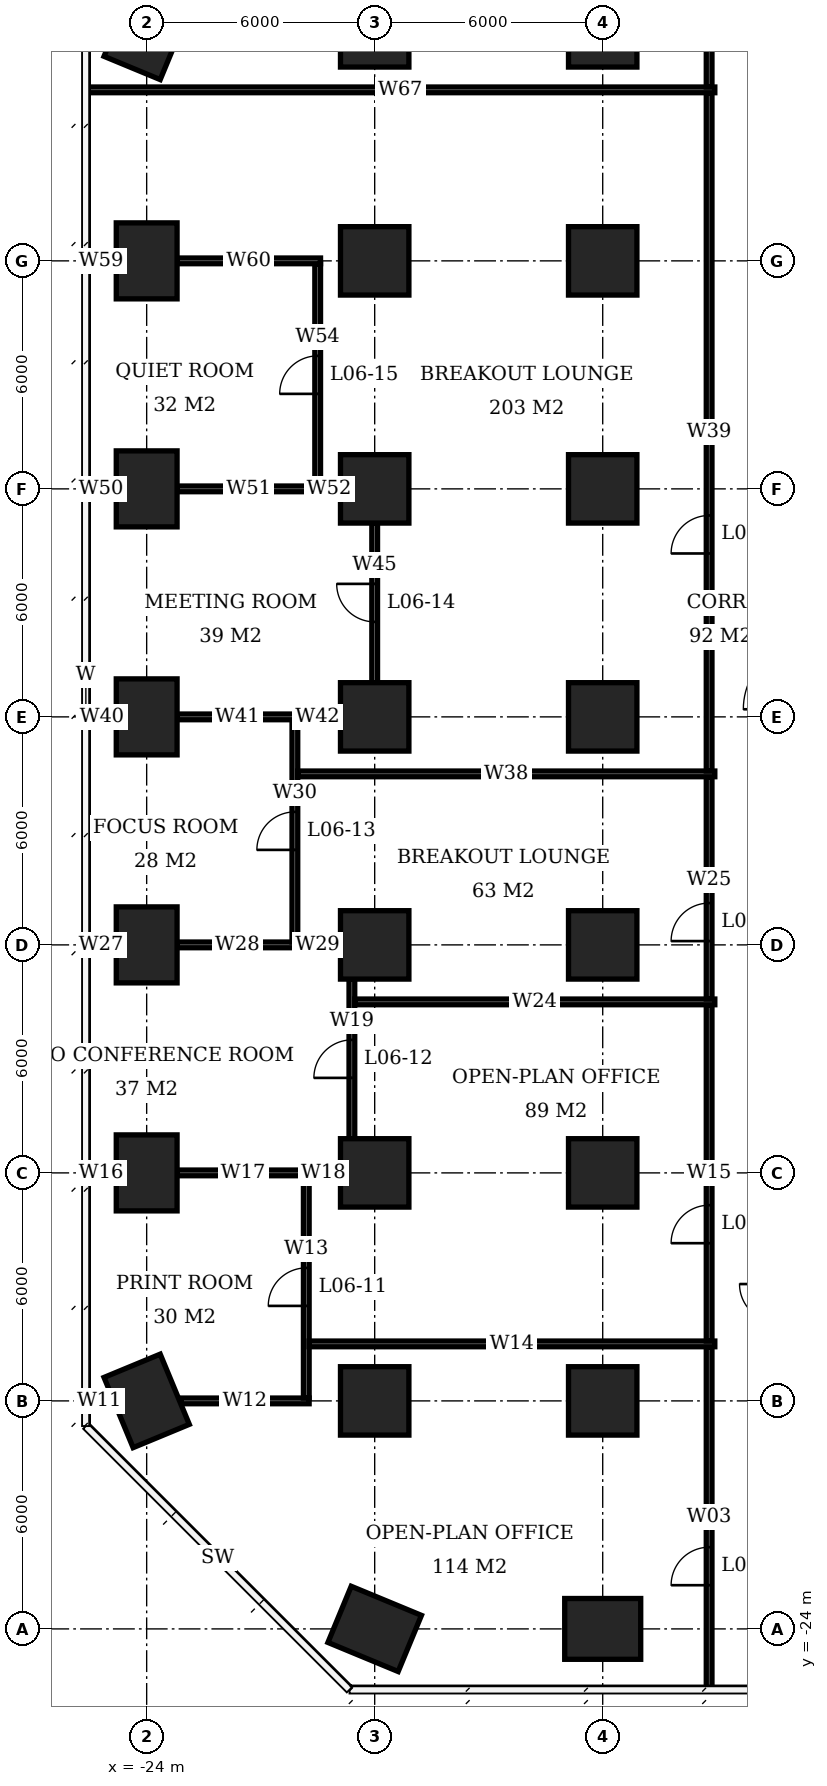
"""IFC4 building model, lengths in metres.
Left out: names, types, materials, properties, quantities, classifications, styles, units other than length and angle.
Written with IfcOpenShell. Run it as: python <this file> out.ifc"""

import sys

from ifc_helpers import new_model, si_unit, direction, frame, frame_2d, origin, origin_2d, place, context, subcontext, project, spatial, rectangle, extrude, element, fill, save


model = new_model("IFC4")
c1 = context("Model", 3, precision=1e-05, world=origin(), true_north=direction((0.0, 1.0)))
c2 = subcontext(c1, "Body", "Model", "MODEL_VIEW")
j1 = project(units=[si_unit("LENGTHUNIT", "METRE"), si_unit("PLANEANGLEUNIT", "RADIAN")], contexts=[c1])
p1 = place(None, origin())
s1 = spatial("IfcSite", under=j1, at=p1, CompositionType="ELEMENT")
p2 = place(p1, origin())
s2 = spatial("IfcBuilding", under=s1, at=p2, CompositionType="ELEMENT")
p3 = place(p2, frame((0.0, 0.0, 29.9)))
s3 = spatial("IfcBuildingStorey", under=s2, at=p3, CompositionType="ELEMENT", Elevation=29.9)
for number, where, z_axis, x_axis in (
    (1, (-24.0, -18.0, 0.0), (0.0, 0.0, 1.0), (-0.383, 0.924, 0.0)),
    (2, (-24.0, -12.0, 0.0), (0.0, 0.0, 1.0), (0.0, 1.0, 0.0)),
    (3, (-24.0, -6.0, 0.0), (0.0, 0.0, 1.0), (0.0, 1.0, 0.0)),
    (4, (-24.0, 0.0, 0.0), (0.0, 0.0, 1.0), (0.0, 1.0, 0.0)),
    (5, (-24.0, 6.0, 0.0), (0.0, 0.0, 1.0), (0.0, 1.0, 0.0)),
    (6, (-24.0, 12.0, 0.0), (0.0, 0.0, 1.0), (0.0, 1.0, 0.0)),
    (7, (-24.0, 18.0, 0.0), (0.0, 0.0, 1.0), (0.383, 0.924, 0.0)),
    (8, (-18.0, -24.0, 0.0), (0.0, 0.0, 1.0), (-0.924, 0.383, 0.0)),
):
    element("IfcColumn", number, at=place(p3, frame(where, z_axis=z_axis, x_axis=x_axis)), inside=s3, PredefinedType="COLUMN", context=c2, shape_type="SweptSolid", body=[
        extrude(rectangle(XDim=2.0, YDim=1.6, at=origin_2d()), origin(), (0.0, 0.0, 1.0), 3.9),
    ])
for number, where, z_axis, x_axis in (
    (9, (-18.0, -18.0, 0.0), (0.0, 0.0, 1.0), (1.0, 0.0, 0.0)),
    (10, (-18.0, -12.0, 0.0), (0.0, 0.0, 1.0), (1.0, 0.0, 0.0)),
    (11, (-18.0, -6.0, 0.0), (0.0, 0.0, 1.0), (1.0, 0.0, 0.0)),
    (12, (-18.0, 0.0, 0.0), (0.0, 0.0, 1.0), (1.0, 0.0, 0.0)),
    (13, (-18.0, 6.0, 0.0), (0.0, 0.0, 1.0), (1.0, 0.0, 0.0)),
    (14, (-18.0, 12.0, 0.0), (0.0, 0.0, 1.0), (1.0, 0.0, 0.0)),
    (15, (-18.0, 18.0, 0.0), (0.0, 0.0, 1.0), (1.0, 0.0, 0.0)),
):
    element("IfcColumn", number, at=place(p3, frame(where, z_axis=z_axis, x_axis=x_axis)), inside=s3, PredefinedType="COLUMN", context=c2, shape_type="SweptSolid", body=[
        extrude(rectangle(XDim=1.8, YDim=1.8, at=origin_2d()), origin(), (0.0, 0.0, 1.0), 3.9),
    ])
p4 = place(p3, frame((-12.0, -24.0, 0.0), z_axis=(0.0, 0.0, 1.0), x_axis=(1.0, 0.0, 0.0)))
e16 = element("IfcColumn", 16, at=p4, inside=s3, PredefinedType="COLUMN", context=c2, shape_type="SweptSolid", body=[
    extrude(rectangle(XDim=2.0, YDim=1.6, at=origin_2d()), origin(), (0.0, 0.0, 1.0), 3.9),
])
for number, where, z_axis, x_axis in (
    (17, (-12.0, -18.0, 0.0), (0.0, 0.0, 1.0), (1.0, 0.0, 0.0)),
    (18, (-12.0, -12.0, 0.0), (0.0, 0.0, 1.0), (1.0, 0.0, 0.0)),
    (19, (-12.0, -6.0, 0.0), (0.0, 0.0, 1.0), (1.0, 0.0, 0.0)),
    (20, (-12.0, 0.0, 0.0), (0.0, 0.0, 1.0), (1.0, 0.0, 0.0)),
    (21, (-12.0, 6.0, 0.0), (0.0, 0.0, 1.0), (1.0, 0.0, 0.0)),
    (22, (-12.0, 12.0, 0.0), (0.0, 0.0, 1.0), (1.0, 0.0, 0.0)),
    (23, (-12.0, 18.0, 0.0), (0.0, 0.0, 1.0), (1.0, 0.0, 0.0)),
):
    element("IfcColumn", number, at=place(p3, frame(where, z_axis=z_axis, x_axis=x_axis)), inside=s3, PredefinedType="COLUMN", context=c2, shape_type="SweptSolid", body=[
        extrude(rectangle(XDim=1.8, YDim=1.8, at=origin_2d()), origin(), (0.0, 0.0, 1.0), 3.9),
    ])
p5 = place(p3, frame((-25.6, -18.0, 0.0), z_axis=(0.0, 0.0, 1.0), x_axis=(1.0, 0.0, 0.0)))
e24 = element("IfcWall", 24, at=p5, inside=s3, PredefinedType="PARTITIONING", context=c2, shape_type="SweptSolid", body=[
    extrude(rectangle(XDim=0.703, YDim=0.15, at=frame_2d((0.352, 0.0))), origin(), (0.0, 0.0, 1.0), 3.65),
])
p6 = place(p3, frame((-23.103, -18.0, 0.0), z_axis=(0.0, 0.0, 1.0), x_axis=(1.0, 0.0, 0.0)))
e25 = element("IfcWall", 25, at=p6, inside=s3, PredefinedType="PARTITIONING", context=c2, shape_type="SweptSolid", body=[
    extrude(rectangle(XDim=3.378, YDim=0.15, at=frame_2d((1.689, 0.0))), origin(), (0.0, 0.0, 1.0), 3.65),
])
p7 = place(p3, frame((-25.6, -12.0, 0.0), z_axis=(0.0, 0.0, 1.0), x_axis=(1.0, 0.0, 0.0)))
e26 = element("IfcWall", 26, at=p7, inside=s3, PredefinedType="PARTITIONING", context=c2, shape_type="SweptSolid", body=[
    extrude(rectangle(XDim=0.8, YDim=0.15, at=frame_2d((0.4, 0.0))), origin(), (0.0, 0.0, 1.0), 3.65),
])
p8 = place(p3, frame((-23.2, -12.0, 0.0), z_axis=(0.0, 0.0, 1.0), x_axis=(1.0, 0.0, 0.0)))
e27 = element("IfcWall", 27, at=p8, inside=s3, PredefinedType="PARTITIONING", context=c2, shape_type="SweptSolid", body=[
    extrude(rectangle(XDim=3.475, YDim=0.15, at=frame_2d((1.737, 0.0))), origin(), (0.0, 0.0, 1.0), 3.65),
])
p9 = place(p3, frame((-19.8, -12.0, 0.0), z_axis=(0.0, 0.0, 1.0), x_axis=(1.0, 0.0, 0.0)))
e28 = element("IfcWall", 28, at=p9, inside=s3, PredefinedType="PARTITIONING", context=c2, shape_type="SweptSolid", body=[
    extrude(rectangle(XDim=0.9, YDim=0.15, at=frame_2d((0.45, 0.0))), origin(), (0.0, 0.0, 1.0), 3.65),
])
p10 = place(p3, frame((-25.6, -6.0, 0.0), z_axis=(0.0, 0.0, 1.0), x_axis=(1.0, 0.0, 0.0)))
e29 = element("IfcWall", 29, at=p10, inside=s3, PredefinedType="PARTITIONING", context=c2, shape_type="SweptSolid", body=[
    extrude(rectangle(XDim=0.8, YDim=0.15, at=frame_2d((0.4, 0.0))), origin(), (0.0, 0.0, 1.0), 3.65),
])
p11 = place(p3, frame((-23.2, -6.0, 0.0), z_axis=(0.0, 0.0, 1.0), x_axis=(1.0, 0.0, 0.0)))
e30 = element("IfcWall", 30, at=p11, inside=s3, PredefinedType="PARTITIONING", context=c2, shape_type="SweptSolid", body=[
    extrude(rectangle(XDim=3.175, YDim=0.15, at=frame_2d((1.587, 0.0))), origin(), (0.0, 0.0, 1.0), 3.65),
])
p12 = place(p3, frame((-20.1, -6.0, 0.0), z_axis=(0.0, 0.0, 1.0), x_axis=(1.0, 0.0, 0.0)))
e31 = element("IfcWall", 31, at=p12, inside=s3, PredefinedType="PARTITIONING", context=c2, shape_type="SweptSolid", body=[
    extrude(rectangle(XDim=1.2, YDim=0.15, at=frame_2d((0.6, 0.0))), origin(), (0.0, 0.0, 1.0), 3.65),
])
p13 = place(p3, frame((-25.55, 0.0, 0.0), z_axis=(0.0, 0.0, 1.0), x_axis=(1.0, 0.0, 0.0)))
e32 = element("IfcWall", 32, at=p13, inside=s3, PredefinedType="PARTITIONING", context=c2, shape_type="SweptSolid", body=[
    extrude(rectangle(XDim=0.75, YDim=0.15, at=frame_2d((0.375, 0.0))), origin(), (0.0, 0.0, 1.0), 3.65),
])
p14 = place(p3, frame((-23.2, 0.0, 0.0), z_axis=(0.0, 0.0, 1.0), x_axis=(1.0, 0.0, 0.0)))
e33 = element("IfcWall", 33, at=p14, inside=s3, PredefinedType="PARTITIONING", context=c2, shape_type="SweptSolid", body=[
    extrude(rectangle(XDim=3.175, YDim=0.15, at=frame_2d((1.587, 0.0))), origin(), (0.0, 0.0, 1.0), 3.65),
])
p15 = place(p3, frame((-20.1, 0.0, 0.0), z_axis=(0.0, 0.0, 1.0), x_axis=(1.0, 0.0, 0.0)))
e34 = element("IfcWall", 34, at=p15, inside=s3, PredefinedType="PARTITIONING", context=c2, shape_type="SweptSolid", body=[
    extrude(rectangle(XDim=1.2, YDim=0.15, at=frame_2d((0.6, 0.0))), origin(), (0.0, 0.0, 1.0), 3.65),
])
p16 = place(p3, frame((-25.6, 6.0, 0.0), z_axis=(0.0, 0.0, 1.0), x_axis=(1.0, 0.0, 0.0)))
e35 = element("IfcWall", 35, at=p16, inside=s3, PredefinedType="PARTITIONING", context=c2, shape_type="SweptSolid", body=[
    extrude(rectangle(XDim=0.8, YDim=0.15, at=frame_2d((0.4, 0.0))), origin(), (0.0, 0.0, 1.0), 3.65),
])
p17 = place(p3, frame((-23.2, 6.0, 0.0), z_axis=(0.0, 0.0, 1.0), x_axis=(1.0, 0.0, 0.0)))
e36 = element("IfcWall", 36, at=p17, inside=s3, PredefinedType="PARTITIONING", context=c2, shape_type="SweptSolid", body=[
    extrude(rectangle(XDim=3.775, YDim=0.15, at=frame_2d((1.887, 0.0))), origin(), (0.0, 0.0, 1.0), 3.65),
])
p18 = place(p3, frame((-19.5, 6.0, 0.0), z_axis=(0.0, 0.0, 1.0), x_axis=(1.0, 0.0, 0.0)))
e37 = element("IfcWall", 37, at=p18, inside=s3, PredefinedType="PARTITIONING", context=c2, shape_type="SweptSolid", body=[
    extrude(rectangle(XDim=0.6, YDim=0.15, at=frame_2d((0.3, 0.0))), origin(), (0.0, 0.0, 1.0), 3.65),
])
p19 = place(p3, frame((-25.6, 12.0, 0.0), z_axis=(0.0, 0.0, 1.0), x_axis=(1.0, 0.0, 0.0)))
e38 = element("IfcWall", 38, at=p19, inside=s3, PredefinedType="PARTITIONING", context=c2, shape_type="SweptSolid", body=[
    extrude(rectangle(XDim=0.8, YDim=0.15, at=frame_2d((0.4, 0.0))), origin(), (0.0, 0.0, 1.0), 3.65),
])
p20 = place(p3, frame((-23.2, 12.0, 0.0), z_axis=(0.0, 0.0, 1.0), x_axis=(1.0, 0.0, 0.0)))
e39 = element("IfcWall", 39, at=p20, inside=s3, PredefinedType="PARTITIONING", context=c2, shape_type="SweptSolid", body=[
    extrude(rectangle(XDim=3.775, YDim=0.15, at=frame_2d((1.887, 0.0))), origin(), (0.0, 0.0, 1.0), 3.65),
])
p21 = place(p3, frame((-20.1, -5.925, 0.0), z_axis=(0.0, 0.0, 1.0), x_axis=(0.0, 1.0, 0.0)))
e40 = element("IfcWall", 40, at=p21, inside=s3, PredefinedType="PARTITIONING", context=c2, shape_type="SweptSolid", body=[
    extrude(rectangle(XDim=5.85, YDim=0.15, at=frame_2d((2.925, 0.0))), origin(), (0.0, 0.0, 1.0), 3.65),
])
p22 = place(p21, frame((2.425, 0.0, 0.0)))
e41 = element("IfcOpeningElement", 41, at=p22, cuts=e40, PredefinedType="OPENING", context=c2, shape_type="SweptSolid", body=[
    extrude(rectangle(XDim=1.0, YDim=2.1, at=frame_2d((0.5, 1.05))), frame((0.0, 0.085, 0.0), z_axis=(0.0, -1.0, 0.0), x_axis=(1.0, 0.0, 0.0)), (0.0, 0.0, 1.0), 0.17),
])
p23 = place(p3, frame((-19.8, -17.925, 0.0), z_axis=(0.0, 0.0, 1.0), x_axis=(0.0, 1.0, 0.0)))
e42 = element("IfcWall", 42, at=p23, inside=s3, PredefinedType="PARTITIONING", context=c2, shape_type="SweptSolid", body=[
    extrude(rectangle(XDim=5.85, YDim=0.15, at=frame_2d((2.925, 0.0))), origin(), (0.0, 0.0, 1.0), 3.65),
])
p24 = place(p23, frame((2.425, 0.0, 0.0)))
e43 = element("IfcOpeningElement", 43, at=p24, cuts=e42, PredefinedType="OPENING", context=c2, shape_type="SweptSolid", body=[
    extrude(rectangle(XDim=1.0, YDim=2.1, at=frame_2d((0.5, 1.05))), frame((0.0, 0.085, 0.0), z_axis=(0.0, -1.0, 0.0), x_axis=(1.0, 0.0, 0.0)), (0.0, 0.0, 1.0), 0.17),
])
p25 = place(p3, frame((-19.5, 6.075, 0.0), z_axis=(0.0, 0.0, 1.0), x_axis=(0.0, 1.0, 0.0)))
e44 = element("IfcWall", 44, at=p25, inside=s3, PredefinedType="PARTITIONING", context=c2, shape_type="SweptSolid", body=[
    extrude(rectangle(XDim=5.85, YDim=0.15, at=frame_2d((2.925, 0.0))), origin(), (0.0, 0.0, 1.0), 3.65),
])
p26 = place(p25, frame((2.425, 0.0, 0.0)))
e45 = element("IfcOpeningElement", 45, at=p26, cuts=e44, PredefinedType="OPENING", context=c2, shape_type="SweptSolid", body=[
    extrude(rectangle(XDim=1.0, YDim=2.1, at=frame_2d((0.5, 1.05))), frame((0.0, 0.085, 0.0), z_axis=(0.0, -1.0, 0.0), x_axis=(1.0, 0.0, 0.0)), (0.0, 0.0, 1.0), 0.17),
])
p27 = place(p3, frame((-18.6, -11.1, 0.0), z_axis=(0.0, 0.0, 1.0), x_axis=(0.0, 1.0, 0.0)))
e46 = element("IfcWall", 46, at=p27, inside=s3, PredefinedType="PARTITIONING", context=c2, shape_type="SweptSolid", body=[
    extrude(rectangle(XDim=4.2, YDim=0.15, at=frame_2d((2.1, 0.0))), origin(), (0.0, 0.0, 1.0), 3.65),
])
p28 = place(p27, frame((1.6, 0.0, 0.0)))
e47 = element("IfcOpeningElement", 47, at=p28, cuts=e46, PredefinedType="OPENING", context=c2, shape_type="SweptSolid", body=[
    extrude(rectangle(XDim=1.0, YDim=2.1, at=frame_2d((0.5, 1.05))), frame((0.0, 0.085, 0.0), z_axis=(0.0, -1.0, 0.0), x_axis=(1.0, 0.0, 0.0)), (0.0, 0.0, 1.0), 0.17),
])
p29 = place(p3, frame((-18.0, 0.9, 0.0), z_axis=(0.0, 0.0, 1.0), x_axis=(0.0, 1.0, 0.0)))
e48 = element("IfcWall", 48, at=p29, inside=s3, PredefinedType="PARTITIONING", context=c2, shape_type="SweptSolid", body=[
    extrude(rectangle(XDim=4.2, YDim=0.15, at=frame_2d((2.1, 0.0))), origin(), (0.0, 0.0, 1.0), 3.65),
])
p30 = place(p29, frame((1.6, 0.0, 0.0)))
e49 = element("IfcOpeningElement", 49, at=p30, cuts=e48, PredefinedType="OPENING", context=c2, shape_type="SweptSolid", body=[
    extrude(rectangle(XDim=1.0, YDim=2.1, at=frame_2d((0.5, 1.05))), frame((0.0, 0.085, 0.0), z_axis=(0.0, -1.0, 0.0), x_axis=(1.0, 0.0, 0.0)), (0.0, 0.0, 1.0), 0.17),
])
p31 = place(p3, frame((-25.6, 16.5, 0.0), z_axis=(0.0, 0.0, 1.0), x_axis=(1.0, 0.0, 0.0)))
e50 = element("IfcWall", 50, at=p31, inside=s3, PredefinedType="PARTITIONING", context=c2, shape_type="SweptSolid", body=[
    extrude(rectangle(XDim=16.55, YDim=0.15, at=frame_2d((8.275, 0.0))), origin(), (0.0, 0.0, 1.0), 3.65),
])
p32 = place(p3, frame((-20.025, -1.5, 0.0), z_axis=(0.0, 0.0, 1.0), x_axis=(1.0, 0.0, 0.0)))
e51 = element("IfcWall", 51, at=p32, inside=s3, PredefinedType="PARTITIONING", context=c2, shape_type="SweptSolid", body=[
    extrude(rectangle(XDim=10.975, YDim=0.15, at=frame_2d((5.487, 0.0))), origin(), (0.0, 0.0, 1.0), 3.65),
])
p33 = place(p3, frame((-19.725, -16.5, 0.0), z_axis=(0.0, 0.0, 1.0), x_axis=(1.0, 0.0, 0.0)))
e52 = element("IfcWall", 52, at=p33, inside=s3, PredefinedType="PARTITIONING", context=c2, shape_type="SweptSolid", body=[
    extrude(rectangle(XDim=10.675, YDim=0.15, at=frame_2d((5.337, 0.0))), origin(), (0.0, 0.0, 1.0), 3.65),
])
p34 = place(p3, frame((-18.525, -7.5, 0.0), z_axis=(0.0, 0.0, 1.0), x_axis=(1.0, 0.0, 0.0)))
e53 = element("IfcWall", 53, at=p34, inside=s3, PredefinedType="PARTITIONING", context=c2, shape_type="SweptSolid", body=[
    extrude(rectangle(XDim=9.475, YDim=0.15, at=frame_2d((4.737, 0.0))), origin(), (0.0, 0.0, 1.0), 3.65),
])
p35 = place(p3, frame((-9.2, -25.55, 0.0), z_axis=(0.0, 0.0, 1.0), x_axis=(0.0, 1.0, 0.0)))
e54 = element("IfcWall", 54, at=p35, inside=s3, PredefinedType="PARTITIONING", context=c2, shape_type="SweptSolid", body=[
    extrude(rectangle(XDim=8.975, YDim=0.15, at=frame_2d((4.488, 0.0))), origin(), (0.0, 0.0, 1.0), 3.65),
])
p36 = place(p35, frame((2.7, 0.0, 0.0)))
e55 = element("IfcOpeningElement", 55, at=p36, cuts=e54, PredefinedType="OPENING", context=c2, shape_type="SweptSolid", body=[
    extrude(rectangle(XDim=1.0, YDim=2.1, at=frame_2d((0.5, 1.05))), frame((0.0, 0.085, 0.0), z_axis=(0.0, -1.0, 0.0), x_axis=(1.0, 0.0, 0.0)), (0.0, 0.0, 1.0), 0.17),
])
p37 = place(p3, frame((-9.2, -16.425, 0.0), z_axis=(0.0, 0.0, 1.0), x_axis=(0.0, 1.0, 0.0)))
e56 = element("IfcWall", 56, at=p37, inside=s3, PredefinedType="PARTITIONING", context=c2, shape_type="SweptSolid", body=[
    extrude(rectangle(XDim=8.85, YDim=0.15, at=frame_2d((4.425, 0.0))), origin(), (0.0, 0.0, 1.0), 3.65),
])
p38 = place(p37, frame((2.575, 0.0, 0.0)))
e57 = element("IfcOpeningElement", 57, at=p38, cuts=e56, PredefinedType="OPENING", context=c2, shape_type="SweptSolid", body=[
    extrude(rectangle(XDim=1.0, YDim=2.1, at=frame_2d((0.5, 1.05))), frame((0.0, 0.085, 0.0), z_axis=(0.0, -1.0, 0.0), x_axis=(1.0, 0.0, 0.0)), (0.0, 0.0, 1.0), 0.17),
])
p39 = place(p3, frame((-9.2, -7.425, 0.0), z_axis=(0.0, 0.0, 1.0), x_axis=(0.0, 1.0, 0.0)))
e58 = element("IfcWall", 58, at=p39, inside=s3, PredefinedType="PARTITIONING", context=c2, shape_type="SweptSolid", body=[
    extrude(rectangle(XDim=5.85, YDim=0.15, at=frame_2d((2.925, 0.0))), origin(), (0.0, 0.0, 1.0), 3.65),
])
p40 = place(p39, frame((1.525, 0.0, 0.0)))
e59 = element("IfcOpeningElement", 59, at=p40, cuts=e58, PredefinedType="OPENING", context=c2, shape_type="SweptSolid", body=[
    extrude(rectangle(XDim=1.0, YDim=2.1, at=frame_2d((0.5, 1.05))), frame((0.0, 0.085, 0.0), z_axis=(0.0, -1.0, 0.0), x_axis=(1.0, 0.0, 0.0)), (0.0, 0.0, 1.0), 0.17),
])
p41 = place(p3, frame((-9.2, -1.425, 0.0), z_axis=(0.0, 0.0, 1.0), x_axis=(0.0, 1.0, 0.0)))
e60 = element("IfcWall", 60, at=p41, inside=s3, PredefinedType="PARTITIONING", context=c2, shape_type="SweptSolid", body=[
    extrude(rectangle(XDim=17.85, YDim=0.15, at=frame_2d((8.925, 0.0))), origin(), (0.0, 0.0, 1.0), 3.65),
])
p42 = place(p41, frame((5.725, 0.0, 0.0)))
e61 = element("IfcOpeningElement", 61, at=p42, cuts=e60, PredefinedType="OPENING", context=c2, shape_type="SweptSolid", body=[
    extrude(rectangle(XDim=1.0, YDim=2.1, at=frame_2d((0.5, 1.05))), frame((0.0, 0.085, 0.0), z_axis=(0.0, -1.0, 0.0), x_axis=(1.0, 0.0, 0.0)), (0.0, 0.0, 1.0), 0.17),
])
p43 = place(p3, frame((-9.2, 16.575, 0.0), z_axis=(0.0, 0.0, 1.0), x_axis=(0.0, 1.0, 0.0)))
e62 = element("IfcWall", 62, at=p43, inside=s3, PredefinedType="PARTITIONING", context=c2, shape_type="SweptSolid", body=[
    extrude(rectangle(XDim=8.975, YDim=0.15, at=frame_2d((4.488, 0.0))), origin(), (0.0, 0.0, 1.0), 3.65),
])
p44 = place(p43, frame((2.575, 0.0, 0.0)))
e63 = element("IfcOpeningElement", 63, at=p44, cuts=e62, PredefinedType="OPENING", context=c2, shape_type="SweptSolid", body=[
    extrude(rectangle(XDim=1.0, YDim=2.1, at=frame_2d((0.5, 1.05))), frame((0.0, 0.085, 0.0), z_axis=(0.0, -1.0, 0.0), x_axis=(1.0, 0.0, 0.0)), (0.0, 0.0, 1.0), 0.17),
])
p45 = place(p24, origin())
e64 = element("IfcDoor", 64, at=p45, inside=s3, OperationType="SINGLE_SWING_LEFT", PredefinedType="DOOR", context=c2, shape_type="SweptSolid", body=[
    extrude(rectangle(XDim=1.0, YDim=2.1, at=frame_2d((0.5, 1.05))), frame((0.0, 0.025, 0.0), z_axis=(0.0, -1.0, 0.0), x_axis=(1.0, 0.0, 0.0)), (0.0, 0.0, 1.0), 0.05),
])
fill(e43, e64)
p46 = place(p28, origin())
e65 = element("IfcDoor", 65, at=p46, inside=s3, OperationType="SINGLE_SWING_LEFT", PredefinedType="DOOR", context=c2, shape_type="SweptSolid", body=[
    extrude(rectangle(XDim=1.0, YDim=2.1, at=frame_2d((0.5, 1.05))), frame((0.0, 0.025, 0.0), z_axis=(0.0, -1.0, 0.0), x_axis=(1.0, 0.0, 0.0)), (0.0, 0.0, 1.0), 0.05),
])
fill(e47, e65)
p47 = place(p22, origin())
e66 = element("IfcDoor", 66, at=p47, inside=s3, OperationType="SINGLE_SWING_LEFT", PredefinedType="DOOR", context=c2, shape_type="SweptSolid", body=[
    extrude(rectangle(XDim=1.0, YDim=2.1, at=frame_2d((0.5, 1.05))), frame((0.0, 0.025, 0.0), z_axis=(0.0, -1.0, 0.0), x_axis=(1.0, 0.0, 0.0)), (0.0, 0.0, 1.0), 0.05),
])
fill(e41, e66)
p48 = place(p30, origin())
e67 = element("IfcDoor", 67, at=p48, inside=s3, OperationType="SINGLE_SWING_RIGHT", PredefinedType="DOOR", context=c2, shape_type="SweptSolid", body=[
    extrude(rectangle(XDim=1.0, YDim=2.1, at=frame_2d((0.5, 1.05))), frame((0.0, 0.025, 0.0), z_axis=(0.0, -1.0, 0.0), x_axis=(1.0, 0.0, 0.0)), (0.0, 0.0, 1.0), 0.05),
])
fill(e49, e67)
p49 = place(p26, origin())
e68 = element("IfcDoor", 68, at=p49, inside=s3, OperationType="SINGLE_SWING_LEFT", PredefinedType="DOOR", context=c2, shape_type="SweptSolid", body=[
    extrude(rectangle(XDim=1.0, YDim=2.1, at=frame_2d((0.5, 1.05))), frame((0.0, 0.025, 0.0), z_axis=(0.0, -1.0, 0.0), x_axis=(1.0, 0.0, 0.0)), (0.0, 0.0, 1.0), 0.05),
])
fill(e45, e68)
p50 = place(p36, origin())
e69 = element("IfcDoor", 69, at=p50, inside=s3, OperationType="SINGLE_SWING_LEFT", PredefinedType="DOOR", context=c2, shape_type="SweptSolid", body=[
    extrude(rectangle(XDim=1.0, YDim=2.1, at=frame_2d((0.5, 1.05))), frame((0.0, 0.025, 0.0), z_axis=(0.0, -1.0, 0.0), x_axis=(1.0, 0.0, 0.0)), (0.0, 0.0, 1.0), 0.05),
])
fill(e55, e69)
p51 = place(p38, origin())
e70 = element("IfcDoor", 70, at=p51, inside=s3, OperationType="SINGLE_SWING_LEFT", PredefinedType="DOOR", context=c2, shape_type="SweptSolid", body=[
    extrude(rectangle(XDim=1.0, YDim=2.1, at=frame_2d((0.5, 1.05))), frame((0.0, 0.025, 0.0), z_axis=(0.0, -1.0, 0.0), x_axis=(1.0, 0.0, 0.0)), (0.0, 0.0, 1.0), 0.05),
])
fill(e57, e70)
p52 = place(p40, origin())
e71 = element("IfcDoor", 71, at=p52, inside=s3, OperationType="SINGLE_SWING_LEFT", PredefinedType="DOOR", context=c2, shape_type="SweptSolid", body=[
    extrude(rectangle(XDim=1.0, YDim=2.1, at=frame_2d((0.5, 1.05))), frame((0.0, 0.025, 0.0), z_axis=(0.0, -1.0, 0.0), x_axis=(1.0, 0.0, 0.0)), (0.0, 0.0, 1.0), 0.05),
])
fill(e59, e71)
p53 = place(p42, origin())
e72 = element("IfcDoor", 72, at=p53, inside=s3, OperationType="SINGLE_SWING_LEFT", PredefinedType="DOOR", context=c2, shape_type="SweptSolid", body=[
    extrude(rectangle(XDim=1.0, YDim=2.1, at=frame_2d((0.5, 1.05))), frame((0.0, 0.025, 0.0), z_axis=(0.0, -1.0, 0.0), x_axis=(1.0, 0.0, 0.0)), (0.0, 0.0, 1.0), 0.05),
])
fill(e61, e72)
save(model, sys.argv[1])
